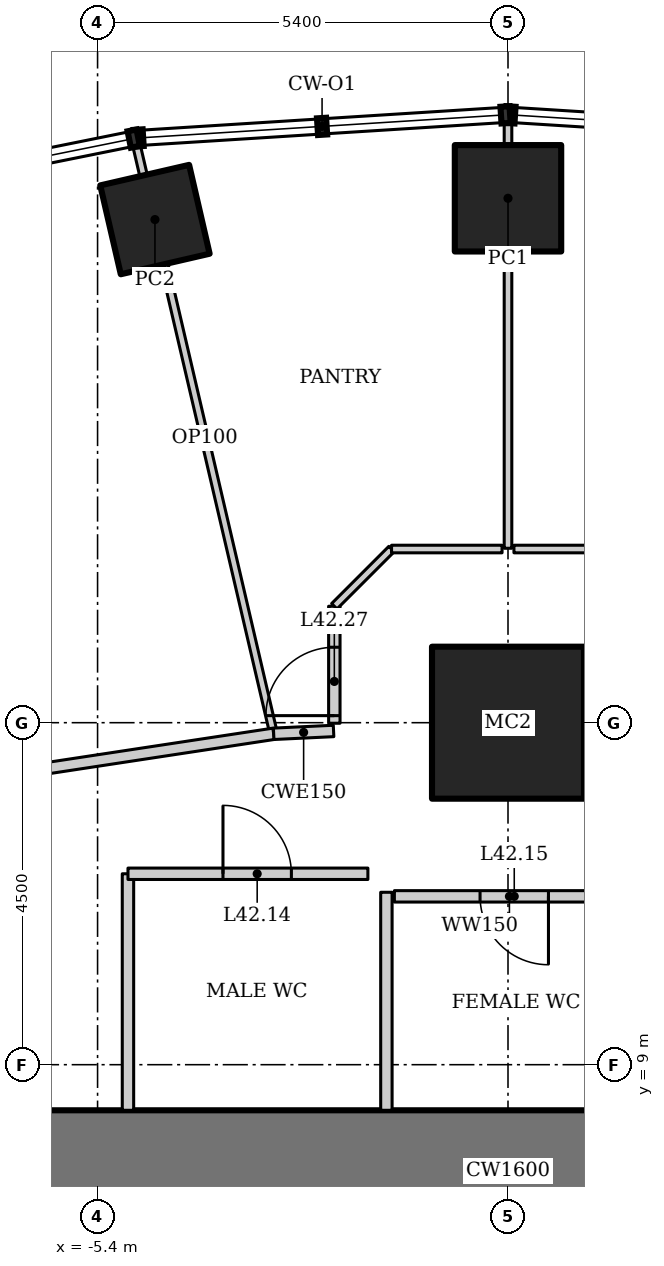
"""IFC4 building model, lengths in metres.
Left out: names, types, materials, properties, quantities, classifications, styles, units other than length and angle.
Written with IfcOpenShell. Run it as: python <this file> out.ifc"""

import sys

from ifc_helpers import new_model, si_unit, direction, frame, frame_2d, origin, origin_2d, place, context, subcontext, project, spatial, rectangle, hollow_rectangle, extrude, element, fill, save


model = new_model("IFC4")
c1 = context("Model", 3, precision=1e-05, world=origin(), true_north=direction((0.0, 1.0)))
c2 = subcontext(c1, "Body", "Model", "MODEL_VIEW")
j1 = project(units=[si_unit("LENGTHUNIT", "METRE"), si_unit("PLANEANGLEUNIT", "RADIAN")], contexts=[c1])
p1 = place(None, origin())
s1 = spatial("IfcSite", under=j1, at=p1, CompositionType="ELEMENT")
p2 = place(p1, origin())
s2 = spatial("IfcBuilding", under=s1, at=p2, CompositionType="ELEMENT")
p3 = place(p2, frame((0.0, 0.0, 180.4)))
s3 = spatial("IfcBuildingStorey", under=s2, at=p3, CompositionType="ELEMENT", Elevation=180.4)
p4 = place(p3, frame((0.0, 13.5, 0.0), z_axis=(0.0, 0.0, 1.0), x_axis=(1.0, 0.0, 0.0)))
e1 = element("IfcColumn", 1, at=p4, inside=s3, PredefinedType="COLUMN", context=c2, shape_type="SweptSolid", body=[
    extrude(hollow_rectangle(XDim=2.0, YDim=2.0, WallThickness=0.17, at=origin_2d()), origin(), (0.0, 0.0, 1.0), 4.2),
])
p5 = place(p3, frame((0.0, 20.4, 0.0), z_axis=(0.0, 0.0, 1.0), x_axis=(1.0, 0.0, 0.0)))
e2 = element("IfcColumn", 2, at=p5, inside=s3, PredefinedType="COLUMN", context=c2, shape_type="SweptSolid", body=[
    extrude(hollow_rectangle(XDim=1.4, YDim=1.4, WallThickness=0.1, at=origin_2d()), origin(), (0.0, 0.0, 1.0), 4.2),
])
p6 = place(p3, frame((-4.645, 20.12, 0.0), z_axis=(0.0, 0.0, 1.0), x_axis=(0.974370064785, 0.224951054344, 0.0)))
e3 = element("IfcColumn", 3, at=p6, inside=s3, PredefinedType="COLUMN", context=c2, shape_type="SweptSolid", body=[
    extrude(hollow_rectangle(XDim=1.2, YDim=1.2, WallThickness=0.1, at=origin_2d()), origin(), (0.0, 0.0, 1.0), 4.2),
])
p7 = place(p3, frame((12.2, 7.6, 0.0), z_axis=(0.0, 0.0, 1.0), x_axis=(-1.0, 0.0, 0.0)))
e4 = element("IfcWall", 4, at=p7, inside=s3, PredefinedType="SHEAR", context=c2, shape_type="SweptSolid", body=[
    extrude(rectangle(XDim=24.4, YDim=1.6, at=frame_2d((12.2, 0.0))), origin(), (0.0, 0.0, 1.0), 4.2),
])
p8 = place(p3, frame((-4.897, 21.135, 0.0), z_axis=(0.0, 0.0, 1.0), x_axis=(0.227039313577, -0.973885593943, 0.0)))
e5 = element("IfcWall", 5, at=p8, inside=s3, PredefinedType="PARTITIONING", context=c2, shape_type="SweptSolid", body=[
    extrude(rectangle(XDim=7.99, YDim=0.1, at=frame_2d((3.995, 0.0))), origin(), (0.0, 0.0, 1.0), 3.293),
])
p9 = place(p3, frame((-3.083, 13.354, 0.0), z_axis=(0.0, 0.0, 1.0), x_axis=(-0.988668719464, -0.150113833987, 0.0)))
e6 = element("IfcWall", 6, at=p9, inside=s3, PredefinedType="PARTITIONING", context=c2, shape_type="SweptSolid", body=[
    extrude(rectangle(XDim=3.493, YDim=0.15, at=frame_2d((1.747, 0.0))), origin(), (0.0, 0.0, 1.0), 4.05),
])
p10 = place(p3, frame((-5.0, 8.4, 0.0), z_axis=(0.0, 0.0, 1.0), x_axis=(0.0, 1.0, 0.0)))
e7 = element("IfcWall", 7, at=p10, inside=s3, PredefinedType="SOLIDWALL", context=c2, shape_type="SweptSolid", body=[
    extrude(rectangle(XDim=3.112, YDim=0.15, at=frame_2d((1.556, 0.0))), origin(), (0.0, 0.0, 1.0), 4.05),
])
p11 = place(p3, frame((0.0, 21.445, 0.0), z_axis=(0.0, 0.0, 1.0), x_axis=(0.0, -1.0, 0.0)))
e8 = element("IfcWall", 8, at=p11, inside=s3, PredefinedType="PARTITIONING", context=c2, shape_type="SweptSolid", body=[
    extrude(rectangle(XDim=5.65, YDim=0.1, at=frame_2d((2.825, 0.0))), origin(), (0.0, 0.0, 1.0), 3.646),
])
p12 = place(p3, frame((-2.295, 13.391, 0.0), z_axis=(0.0, 0.0, 1.0), x_axis=(-0.998878614804, -0.04734461836, 0.0)))
e9 = element("IfcWall", 9, at=p12, inside=s3, PredefinedType="PARTITIONING", context=c2, shape_type="SweptSolid", body=[
    extrude(rectangle(XDim=0.789, YDim=0.15, at=frame_2d((0.395, 0.0))), origin(), (0.0, 0.0, 1.0), 4.05),
])
p13 = place(p3, frame((-5.0, 11.512, 0.0), z_axis=(0.0, 0.0, 1.0), x_axis=(1.0, 0.0, 0.0)))
e10 = element("IfcWall", 10, at=p13, inside=s3, PredefinedType="SOLIDWALL", context=c2, shape_type="SweptSolid", body=[
    extrude(rectangle(XDim=3.156, YDim=0.15, at=frame_2d((1.578, 0.0))), origin(), (0.0, 0.0, 1.0), 4.05),
])
p14 = place(p13, frame((1.25, 0.0, 0.0)))
e11 = element("IfcOpeningElement", 11, at=p14, cuts=e10, PredefinedType="OPENING", context=c2, shape_type="SweptSolid", body=[
    extrude(rectangle(XDim=0.9, YDim=2.1, at=frame_2d((0.45, 1.05))), frame((0.0, 0.085, 0.0), z_axis=(0.0, -1.0, 0.0), x_axis=(1.0, 0.0, 0.0)), (0.0, 0.0, 1.0), 0.17),
])
p15 = place(p3, frame((-1.6, 8.4, 0.0), z_axis=(0.0, 0.0, 1.0), x_axis=(0.0, 1.0, 0.0)))
e12 = element("IfcWall", 12, at=p15, inside=s3, PredefinedType="SOLIDWALL", context=c2, shape_type="SweptSolid", body=[
    extrude(rectangle(XDim=2.869, YDim=0.15, at=frame_2d((1.434, 0.0))), origin(), (0.0, 0.0, 1.0), 4.05),
])
p16 = place(p3, frame((1.532, 11.215, 0.0), z_axis=(0.0, 0.0, 1.0), x_axis=(-1.0, 0.0, 0.0)))
e13 = element("IfcWall", 13, at=p16, inside=s3, PredefinedType="SOLIDWALL", context=c2, shape_type="SweptSolid", body=[
    extrude(rectangle(XDim=3.027, YDim=0.15, at=frame_2d((1.514, 0.0))), origin(), (0.0, 0.0, 1.0), 4.05),
])
p17 = place(p16, frame((1.0, 0.0, 0.0)))
e14 = element("IfcOpeningElement", 14, at=p17, cuts=e13, PredefinedType="OPENING", context=c2, shape_type="SweptSolid", body=[
    extrude(rectangle(XDim=0.9, YDim=2.1, at=frame_2d((0.45, 1.05))), frame((0.0, 0.085, 0.0), z_axis=(0.0, -1.0, 0.0), x_axis=(1.0, 0.0, 0.0)), (0.0, 0.0, 1.0), 0.17),
])
p18 = place(p3, frame((0.078, 15.785, 0.0), z_axis=(0.0, 0.0, 1.0), x_axis=(1.0, 0.0, 0.0)))
e15 = element("IfcWall", 15, at=p18, inside=s3, PredefinedType="PARTITIONING", context=c2, shape_type="SweptSolid", body=[
    extrude(rectangle(XDim=1.454, YDim=0.1, at=frame_2d((0.727, 0.0))), origin(), (0.0, 0.0, 1.0), 4.05),
])
p19 = place(p3, frame((-2.285, 13.493, 0.0), z_axis=(0.0, 0.0, 1.0), x_axis=(0.0, 1.0, 0.0)))
e16 = element("IfcWall", 16, at=p19, inside=s3, PredefinedType="PARTITIONING", context=c2, shape_type="SweptSolid", body=[
    extrude(rectangle(XDim=1.54, YDim=0.15, at=frame_2d((0.77, 0.0))), origin(), (0.0, 0.0, 1.0), 4.05),
])
p20 = place(p19, frame((0.1, 0.0, 0.0)))
e17 = element("IfcOpeningElement", 17, at=p20, cuts=e16, PredefinedType="OPENING", context=c2, shape_type="SweptSolid", body=[
    extrude(rectangle(XDim=0.9, YDim=2.1, at=frame_2d((0.45, 1.05))), frame((0.0, 0.085, 0.0), z_axis=(0.0, -1.0, 0.0), x_axis=(1.0, 0.0, 0.0)), (0.0, 0.0, 1.0), 0.17),
])
p21 = place(p3, frame((-2.285, 15.032, 0.0), z_axis=(0.0, 0.0, 1.0), x_axis=(0.707106781187, 0.707106781187, 0.0)))
e18 = element("IfcWall", 18, at=p21, inside=s3, PredefinedType="PARTITIONING", context=c2, shape_type="SweptSolid", body=[
    extrude(rectangle(XDim=1.064, YDim=0.1, at=frame_2d((0.532, 0.0))), origin(), (0.0, 0.0, 1.0), 4.05),
])
p22 = place(p3, frame((-1.532, 15.785, 0.0), z_axis=(0.0, 0.0, 1.0), x_axis=(1.0, 0.0, 0.0)))
e19 = element("IfcWall", 19, at=p22, inside=s3, PredefinedType="PARTITIONING", context=c2, shape_type="SweptSolid", body=[
    extrude(rectangle(XDim=1.454, YDim=0.1, at=frame_2d((0.727, 0.0))), origin(), (0.0, 0.0, 1.0), 4.05),
])
p23 = place(p14, origin())
e20 = element("IfcDoor", 20, at=p23, inside=s3, OperationType="SINGLE_SWING_LEFT", PredefinedType="DOOR", context=c2, shape_type="SweptSolid", body=[
    extrude(rectangle(XDim=0.9, YDim=2.1, at=frame_2d((0.45, 1.05))), frame((0.0, 0.025, 0.0), z_axis=(0.0, -1.0, 0.0), x_axis=(1.0, 0.0, 0.0)), (0.0, 0.0, 1.0), 0.05),
])
fill(e11, e20)
p24 = place(p17, origin())
e21 = element("IfcDoor", 21, at=p24, inside=s3, OperationType="SINGLE_SWING_LEFT", PredefinedType="DOOR", context=c2, shape_type="SweptSolid", body=[
    extrude(rectangle(XDim=0.9, YDim=2.1, at=frame_2d((0.45, 1.05))), frame((0.0, 0.025, 0.0), z_axis=(0.0, -1.0, 0.0), x_axis=(1.0, 0.0, 0.0)), (0.0, 0.0, 1.0), 0.05),
])
fill(e14, e21)
p25 = place(p20, origin())
e22 = element("IfcDoor", 22, at=p25, inside=s3, OperationType="SINGLE_SWING_LEFT", PredefinedType="DOOR", context=c2, shape_type="SweptSolid", body=[
    extrude(rectangle(XDim=0.9, YDim=2.1, at=frame_2d((0.45, 1.05))), frame((0.0, 0.025, 0.0), z_axis=(0.0, -1.0, 0.0), x_axis=(1.0, 0.0, 0.0)), (0.0, 0.0, 1.0), 0.05),
])
fill(e17, e22)
save(model, sys.argv[1])
